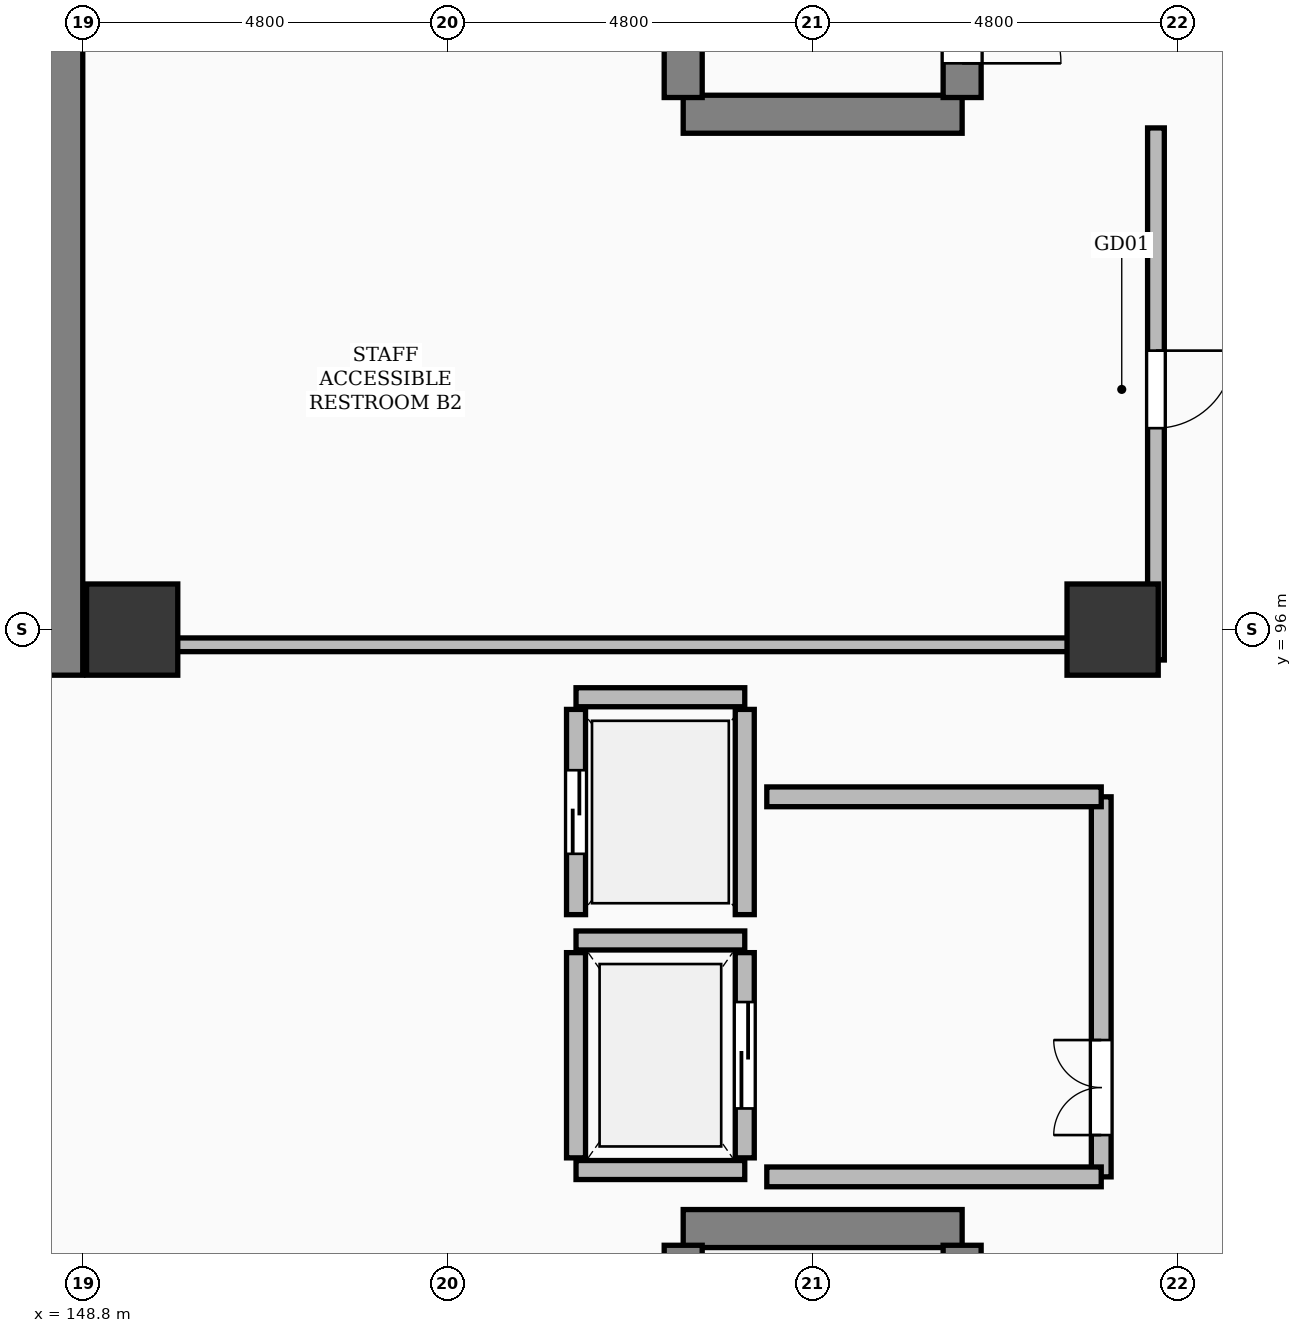
"""IFC4 building model, lengths in metres.
Left out: names, types, materials, properties, quantities, classifications, styles, units other than length and angle.
Written with IfcOpenShell. Run it as: python <this file> out.ifc"""

import sys

from ifc_helpers import new_model, si_unit, direction, frame, frame_2d, origin, origin_2d, place, context, subcontext, project, spatial, rectangle, extrude, element, fill, save


model = new_model("IFC4")
c1 = context("Model", 3, precision=1e-05, world=origin(), true_north=direction((0.0, 1.0)))
c2 = subcontext(c1, "Body", "Model", "MODEL_VIEW")
j1 = project(units=[si_unit("LENGTHUNIT", "METRE"), si_unit("PLANEANGLEUNIT", "RADIAN")], contexts=[c1])
p1 = place(None, origin())
s1 = spatial("IfcSite", under=j1, at=p1, CompositionType="ELEMENT")
p2 = place(p1, origin())
s2 = spatial("IfcBuilding", under=s1, at=p2, CompositionType="ELEMENT")
p3 = place(p2, frame((0.0, 0.0, -8.4)))
s3 = spatial("IfcBuildingStorey", under=s2, at=p3, CompositionType="ELEMENT", Elevation=-8.4)
for number, where, z_axis, x_axis in (
    (1, (149.45, 96.0, 0.0), (0.0, 0.0, 1.0), (1.0, 0.0, 0.0)),
    (2, (162.35, 96.0, 0.0), (0.0, 0.0, 1.0), (1.0, 0.0, 0.0)),
):
    element("IfcColumn", number, at=place(p3, frame(where, z_axis=z_axis, x_axis=x_axis)), inside=s3, PredefinedType="COLUMN", context=c2, shape_type="SweptSolid", body=[
        extrude(rectangle(XDim=1.2, YDim=1.2, at=origin_2d()), origin(), (0.0, 0.0, 1.0), 4.2),
    ])
p4 = place(p3, frame((148.5, 95.4, 0.0), z_axis=(0.0, 0.0, 1.0), x_axis=(0.0, 1.0, 0.0)))
e3 = element("IfcWall", 3, at=p4, inside=s3, PredefinedType="USERDEFINED", context=c2, shape_type="SweptSolid", body=[
    extrude(rectangle(XDim=30.6, YDim=0.6, at=frame_2d((15.3, 0.0))), origin(), (0.0, 0.0, 1.0), 3.86),
])
p5 = place(p3, frame((156.7, 88.12, 0.0), z_axis=(0.0, 0.0, 1.0), x_axis=(1.0, 0.0, 0.0)))
e4 = element("IfcWall", 4, at=p5, inside=s3, PredefinedType="SHEAR", context=c2, shape_type="SweptSolid", body=[
    extrude(rectangle(XDim=3.67, YDim=0.5, at=frame_2d((1.835, 0.0))), origin(), (0.0, 0.0, 1.0), 3.86),
])
p6 = place(p3, frame((156.7, 77.4, 0.0), z_axis=(0.0, 0.0, 1.0), x_axis=(0.0, 1.0, 0.0)))
e5 = element("IfcWall", 5, at=p6, inside=s3, PredefinedType="SHEAR", context=c2, shape_type="SweptSolid", body=[
    extrude(rectangle(XDim=10.5, YDim=0.5, at=frame_2d((5.25, 0.0))), origin(), (0.0, 0.0, 1.0), 3.86),
])
p7 = place(p3, frame((160.37, 77.4, 0.0), z_axis=(0.0, 0.0, 1.0), x_axis=(0.0, 1.0, 0.0)))
e6 = element("IfcWall", 6, at=p7, inside=s3, PredefinedType="SHEAR", context=c2, shape_type="SweptSolid", body=[
    extrude(rectangle(XDim=10.5, YDim=0.5, at=frame_2d((5.25, 0.0))), origin(), (0.0, 0.0, 1.0), 3.86),
])
p8 = place(p7, frame((0.45, 0.0, 0.0)))
e7 = element("IfcOpeningElement", 7, at=p8, cuts=e6, PredefinedType="OPENING", context=c2, shape_type="SweptSolid", body=[
    extrude(rectangle(XDim=1.3, YDim=2.15, at=frame_2d((0.65, 1.075))), frame((0.0, 0.262, 0.0), z_axis=(0.0, -1.0, 0.0), x_axis=(1.0, 0.0, 0.0)), (0.0, 0.0, 1.0), 0.524),
])
for number, where, z_axis, x_axis in (
    (8, (155.29, 88.89, 0.0), (0.0, 0.0, 1.0), (1.0, 0.0, 0.0)),
    (9, (155.29, 91.91, 0.0), (0.0, 0.0, 1.0), (1.0, 0.0, 0.0)),
):
    element("IfcWall", number, at=place(p3, frame(where, z_axis=z_axis, x_axis=x_axis)), inside=s3, PredefinedType="SOLIDWALL", context=c2, shape_type="SweptSolid", body=[
        extrude(rectangle(XDim=2.22, YDim=0.25, at=frame_2d((1.11, 0.0))), origin(), (0.0, 0.0, 1.0), 3.86),
    ])
p9 = place(p3, frame((155.29, 89.05, 0.0), z_axis=(0.0, 0.0, 1.0), x_axis=(0.0, 1.0, 0.0)))
e10 = element("IfcWall", 10, at=p9, inside=s3, PredefinedType="SOLIDWALL", context=c2, shape_type="SweptSolid", body=[
    extrude(rectangle(XDim=2.7, YDim=0.25, at=frame_2d((1.35, 0.0))), origin(), (0.0, 0.0, 1.0), 3.86),
])
p10 = place(p3, frame((157.51, 89.05, 0.0), z_axis=(0.0, 0.0, 1.0), x_axis=(0.0, 1.0, 0.0)))
e11 = element("IfcWall", 11, at=p10, inside=s3, PredefinedType="SOLIDWALL", context=c2, shape_type="SweptSolid", body=[
    extrude(rectangle(XDim=2.7, YDim=0.25, at=frame_2d((1.35, 0.0))), origin(), (0.0, 0.0, 1.0), 3.86),
])
p11 = place(p10, frame((0.65, 0.0, 0.0)))
e12 = element("IfcOpeningElement", 12, at=p11, cuts=e11, PredefinedType="OPENING", context=c2, shape_type="SweptSolid", body=[
    extrude(rectangle(XDim=1.4, YDim=2.3, at=frame_2d((0.7, 1.15))), frame((0.0, 0.137, 0.0), z_axis=(0.0, -1.0, 0.0), x_axis=(1.0, 0.0, 0.0)), (0.0, 0.0, 1.0), 0.274),
])
p12 = place(p3, frame((155.29, 95.11, 0.0), z_axis=(0.0, 0.0, 1.0), x_axis=(1.0, 0.0, 0.0)))
e13 = element("IfcWall", 13, at=p12, inside=s3, PredefinedType="SOLIDWALL", context=c2, shape_type="SweptSolid", body=[
    extrude(rectangle(XDim=2.22, YDim=0.25, at=frame_2d((1.11, 0.0))), origin(), (0.0, 0.0, 1.0), 3.86),
])
p13 = place(p3, frame((155.29, 92.25, 0.0), z_axis=(0.0, 0.0, 1.0), x_axis=(0.0, 1.0, 0.0)))
e14 = element("IfcWall", 14, at=p13, inside=s3, PredefinedType="SOLIDWALL", context=c2, shape_type="SweptSolid", body=[
    extrude(rectangle(XDim=2.7, YDim=0.25, at=frame_2d((1.35, 0.0))), origin(), (0.0, 0.0, 1.0), 3.86),
])
p14 = place(p13, frame((0.8, 0.0, 0.0)))
e15 = element("IfcOpeningElement", 15, at=p14, cuts=e14, PredefinedType="OPENING", context=c2, shape_type="SweptSolid", body=[
    extrude(rectangle(XDim=1.1, YDim=2.2, at=frame_2d((0.55, 1.1))), frame((0.0, 0.137, 0.0), z_axis=(0.0, -1.0, 0.0), x_axis=(1.0, 0.0, 0.0)), (0.0, 0.0, 1.0), 0.274),
])
p15 = place(p3, frame((157.51, 92.25, 0.0), z_axis=(0.0, 0.0, 1.0), x_axis=(0.0, 1.0, 0.0)))
e16 = element("IfcWall", 16, at=p15, inside=s3, PredefinedType="SOLIDWALL", context=c2, shape_type="SweptSolid", body=[
    extrude(rectangle(XDim=2.7, YDim=0.25, at=frame_2d((1.35, 0.0))), origin(), (0.0, 0.0, 1.0), 3.86),
])
p16 = place(p3, frame((162.2, 88.8, 0.0), z_axis=(0.0, 0.0, 1.0), x_axis=(0.0, 1.0, 0.0)))
e17 = element("IfcWall", 17, at=p16, inside=s3, PredefinedType="SOLIDWALL", context=c2, shape_type="SweptSolid", body=[
    extrude(rectangle(XDim=5.0, YDim=0.26, at=frame_2d((2.5, 0.0))), origin(), (0.0, 0.0, 1.0), 2.972),
])
p17 = place(p16, frame((0.55, 0.0, 0.0)))
e18 = element("IfcOpeningElement", 18, at=p17, cuts=e17, PredefinedType="OPENING", context=c2, shape_type="SweptSolid", body=[
    extrude(rectangle(XDim=1.25, YDim=2.15, at=frame_2d((0.625, 1.075))), frame((0.0, 0.142, 0.0), z_axis=(0.0, -1.0, 0.0), x_axis=(1.0, 0.0, 0.0)), (0.0, 0.0, 1.0), 0.284),
])
for number, where, z_axis, x_axis in (
    (19, (157.8, 88.8, 0.0), (0.0, 0.0, 1.0), (1.0, 0.0, 0.0)),
    (20, (157.8, 93.8, 0.0), (0.0, 0.0, 1.0), (1.0, 0.0, 0.0)),
):
    element("IfcWall", number, at=place(p3, frame(where, z_axis=z_axis, x_axis=x_axis)), inside=s3, PredefinedType="SOLIDWALL", context=c2, shape_type="SweptSolid", body=[
        extrude(rectangle(XDim=4.4, YDim=0.26, at=frame_2d((2.2, 0.0))), origin(), (0.0, 0.0, 1.0), 2.972),
    ])
p18 = place(p3, frame((156.7, 102.78, 0.0), z_axis=(0.0, 0.0, 1.0), x_axis=(1.0, 0.0, 0.0)))
e21 = element("IfcWall", 21, at=p18, inside=s3, PredefinedType="SHEAR", context=c2, shape_type="SweptSolid", body=[
    extrude(rectangle(XDim=3.67, YDim=0.5, at=frame_2d((1.835, 0.0))), origin(), (0.0, 0.0, 1.0), 3.86),
])
p19 = place(p3, frame((156.7, 103.0, 0.0), z_axis=(0.0, 0.0, 1.0), x_axis=(0.0, 1.0, 0.0)))
e22 = element("IfcWall", 22, at=p19, inside=s3, PredefinedType="SHEAR", context=c2, shape_type="SweptSolid", body=[
    extrude(rectangle(XDim=10.5, YDim=0.5, at=frame_2d((5.25, 0.0))), origin(), (0.0, 0.0, 1.0), 3.86),
])
p20 = place(p3, frame((160.37, 103.0, 0.0), z_axis=(0.0, 0.0, 1.0), x_axis=(0.0, 1.0, 0.0)))
e23 = element("IfcWall", 23, at=p20, inside=s3, PredefinedType="SHEAR", context=c2, shape_type="SweptSolid", body=[
    extrude(rectangle(XDim=10.5, YDim=0.5, at=frame_2d((5.25, 0.0))), origin(), (0.0, 0.0, 1.0), 3.86),
])
p21 = place(p20, frame((0.45, 0.0, 0.0)))
e24 = element("IfcOpeningElement", 24, at=p21, cuts=e23, PredefinedType="OPENING", context=c2, shape_type="SweptSolid", body=[
    extrude(rectangle(XDim=1.3, YDim=2.15, at=frame_2d((0.65, 1.075))), frame((0.0, 0.262, 0.0), z_axis=(0.0, -1.0, 0.0), x_axis=(1.0, 0.0, 0.0)), (0.0, 0.0, 1.0), 0.524),
])
p22 = place(p3, frame((162.92, 95.6, 0.0), z_axis=(0.0, 0.0, 1.0), x_axis=(0.0, 1.0, 0.0)))
e25 = element("IfcWall", 25, at=p22, inside=s3, PredefinedType="PARTITIONING", context=c2, shape_type="SweptSolid", body=[
    extrude(rectangle(XDim=7.0, YDim=0.22, at=frame_2d((3.5, 0.0))), origin(), (0.0, 0.0, 1.0), 2.972),
])
p23 = place(p22, frame((3.05, 0.0, 0.0)))
e26 = element("IfcOpeningElement", 26, at=p23, cuts=e25, PredefinedType="OPENING", context=c2, shape_type="SweptSolid", body=[
    extrude(rectangle(XDim=1.02, YDim=2.2, at=frame_2d((0.51, 1.1))), frame((0.0, 0.122, 0.0), z_axis=(0.0, -1.0, 0.0), x_axis=(1.0, 0.0, 0.0)), (0.0, 0.0, 1.0), 0.244),
])
p24 = place(p3, frame((149.5, 95.8, 0.0), z_axis=(0.0, 0.0, 1.0), x_axis=(1.0, 0.0, 0.0)))
e27 = element("IfcWall", 27, at=p24, inside=s3, PredefinedType="PARTITIONING", context=c2, shape_type="SweptSolid", body=[
    extrude(rectangle(XDim=13.2, YDim=0.18, at=frame_2d((6.6, 0.0))), origin(), (0.0, 0.0, 1.0), 2.972),
])
p25 = place(p11, origin())
e28 = element("IfcDoor", 28, at=p25, inside=s3, OperationType="SLIDING_TO_LEFT", PredefinedType="DOOR", context=c2, shape_type="SweptSolid", body=[
    extrude(rectangle(XDim=1.4, YDim=2.3, at=frame_2d((0.7, 1.15))), frame((0.0, 0.025, 0.0), z_axis=(0.0, -1.0, 0.0), x_axis=(1.0, 0.0, 0.0)), (0.0, 0.0, 1.0), 0.05),
])
fill(e12, e28)
p26 = place(p14, origin())
e29 = element("IfcDoor", 29, at=p26, inside=s3, OperationType="SLIDING_TO_LEFT", PredefinedType="DOOR", context=c2, shape_type="SweptSolid", body=[
    extrude(rectangle(XDim=1.1, YDim=2.2, at=frame_2d((0.55, 1.1))), frame((0.0, 0.025, 0.0), z_axis=(0.0, -1.0, 0.0), x_axis=(1.0, 0.0, 0.0)), (0.0, 0.0, 1.0), 0.05),
])
fill(e15, e29)
p27 = place(p17, origin())
e30 = element("IfcDoor", 30, at=p27, inside=s3, OperationType="DOUBLE_DOOR_SINGLE_SWING", PredefinedType="DOOR", context=c2, shape_type="SweptSolid", body=[
    extrude(rectangle(XDim=1.25, YDim=2.15, at=frame_2d((0.625, 1.075))), frame((0.0, 0.025, 0.0), z_axis=(0.0, -1.0, 0.0), x_axis=(1.0, 0.0, 0.0)), (0.0, 0.0, 1.0), 0.05),
])
fill(e18, e30)
p28 = place(p21, frame((1.3, 0.0, 0.0), z_axis=(0.0, 0.0, 1.0), x_axis=(-1.0, 0.0, 0.0)))
e31 = element("IfcDoor", 31, at=p28, inside=s3, OperationType="SINGLE_SWING_LEFT", PredefinedType="DOOR", context=c2, shape_type="SweptSolid", body=[
    extrude(rectangle(XDim=1.3, YDim=2.15, at=frame_2d((0.65, 1.075))), frame((0.0, 0.025, 0.0), z_axis=(0.0, -1.0, 0.0), x_axis=(1.0, 0.0, 0.0)), (0.0, 0.0, 1.0), 0.05),
])
fill(e24, e31)
p29 = place(p23, frame((1.02, 0.0, 0.0), z_axis=(0.0, 0.0, 1.0), x_axis=(-1.0, 0.0, 0.0)))
e32 = element("IfcDoor", 32, at=p29, inside=s3, OperationType="SINGLE_SWING_RIGHT", PredefinedType="DOOR", context=c2, shape_type="SweptSolid", body=[
    extrude(rectangle(XDim=1.02, YDim=2.2, at=frame_2d((0.51, 1.1))), frame((0.0, 0.025, 0.0), z_axis=(0.0, -1.0, 0.0), x_axis=(1.0, 0.0, 0.0)), (0.0, 0.0, 1.0), 0.05),
])
fill(e26, e32)
save(model, sys.argv[1])
